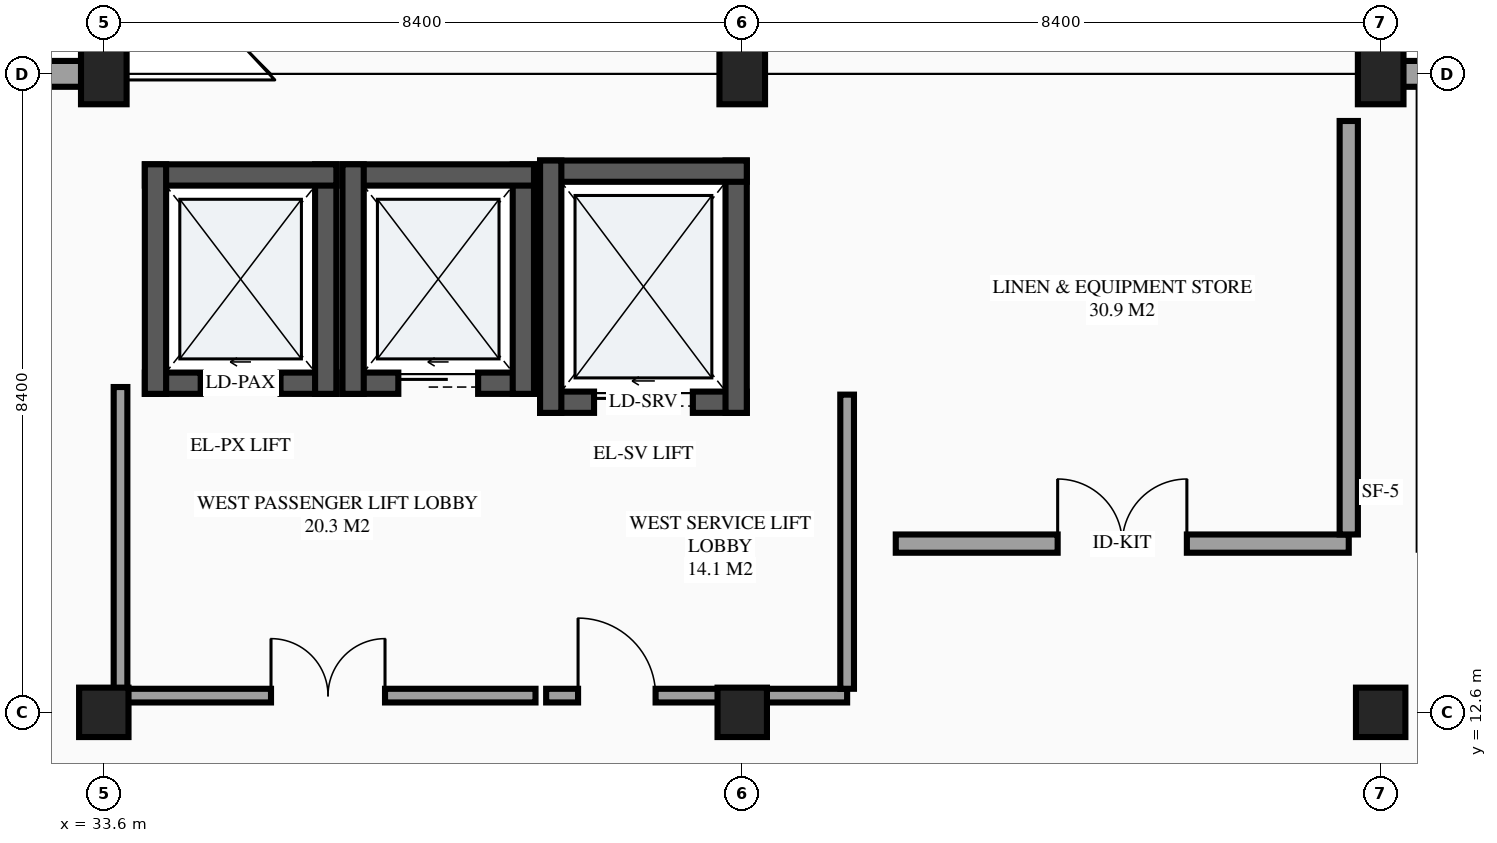
"""IFC4 building model, lengths in metres.
Left out: names, types, materials, properties, quantities, classifications, styles, units other than length and angle.
Written with IfcOpenShell. Run it as: python <this file> out.ifc"""

import sys

from ifc_helpers import new_model, si_unit, direction, frame, frame_2d, origin, origin_2d, place, context, subcontext, project, spatial, rectangle, extrude, element, fill, save


model = new_model("IFC4")
c1 = context("Model", 3, precision=1e-05, world=origin(), true_north=direction((0.0, 1.0)))
c2 = subcontext(c1, "Body", "Model", "MODEL_VIEW")
j1 = project(units=[si_unit("LENGTHUNIT", "METRE"), si_unit("PLANEANGLEUNIT", "RADIAN")], contexts=[c1])
p1 = place(None, origin())
s1 = spatial("IfcSite", under=j1, at=p1, CompositionType="ELEMENT")
p2 = place(p1, origin())
s2 = spatial("IfcBuilding", under=s1, at=p2, CompositionType="ELEMENT")
p3 = place(p2, frame((0.0, 0.0, 21.9)))
s3 = spatial("IfcBuildingStorey", under=s2, at=p3, CompositionType="ELEMENT", Elevation=21.9)
p4 = place(p3, frame((33.6, 12.6, 0.0), z_axis=(0.0, 0.0, 1.0), x_axis=(1.0, 0.0, 0.0)))
e1 = element("IfcColumn", 1, at=p4, inside=s3, PredefinedType="COLUMN", context=c2, shape_type="SweptSolid", body=[
    extrude(rectangle(XDim=0.65, YDim=0.65, at=origin_2d()), origin(), (0.0, 0.0, 1.0), 3.6),
])
p5 = place(p3, frame((33.6, 21.0, 0.0), z_axis=(0.0, 0.0, 1.0), x_axis=(1.0, 0.0, 0.0)))
e2 = element("IfcColumn", 2, at=p5, inside=s3, PredefinedType="COLUMN", context=c2, shape_type="SweptSolid", body=[
    extrude(rectangle(XDim=0.6, YDim=0.8, at=origin_2d()), origin(), (0.0, 0.0, 1.0), 3.6),
])
p6 = place(p3, frame((42.0, 12.6, 0.0), z_axis=(0.0, 0.0, 1.0), x_axis=(1.0, 0.0, 0.0)))
e3 = element("IfcColumn", 3, at=p6, inside=s3, PredefinedType="COLUMN", context=c2, shape_type="SweptSolid", body=[
    extrude(rectangle(XDim=0.65, YDim=0.65, at=origin_2d()), origin(), (0.0, 0.0, 1.0), 3.6),
])
p7 = place(p3, frame((42.0, 21.0, 0.0), z_axis=(0.0, 0.0, 1.0), x_axis=(1.0, 0.0, 0.0)))
e4 = element("IfcColumn", 4, at=p7, inside=s3, PredefinedType="COLUMN", context=c2, shape_type="SweptSolid", body=[
    extrude(rectangle(XDim=0.6, YDim=0.8, at=origin_2d()), origin(), (0.0, 0.0, 1.0), 3.6),
])
p8 = place(p3, frame((50.4, 12.6, 0.0), z_axis=(0.0, 0.0, 1.0), x_axis=(1.0, 0.0, 0.0)))
e5 = element("IfcColumn", 5, at=p8, inside=s3, PredefinedType="COLUMN", context=c2, shape_type="SweptSolid", body=[
    extrude(rectangle(XDim=0.65, YDim=0.65, at=origin_2d()), origin(), (0.0, 0.0, 1.0), 3.6),
])
p9 = place(p3, frame((50.4, 21.0, 0.0), z_axis=(0.0, 0.0, 1.0), x_axis=(1.0, 0.0, 0.0)))
e6 = element("IfcColumn", 6, at=p9, inside=s3, PredefinedType="COLUMN", context=c2, shape_type="SweptSolid", body=[
    extrude(rectangle(XDim=0.6, YDim=0.8, at=origin_2d()), origin(), (0.0, 0.0, 1.0), 3.6),
])
p10 = place(p3, frame((33.6, 21.0, 0.0), z_axis=(0.0, 0.0, 1.0), x_axis=(-1.0, 0.0, 0.0)))
e7 = element("IfcWall", 7, at=p10, inside=s3, PredefinedType="STANDARD", context=c2, shape_type="SweptSolid", body=[
    extrude(rectangle(XDim=2.0, YDim=0.34, at=frame_2d((1.0, 0.0))), origin(), (0.0, 0.0, 1.0), 2.58),
])
p11 = place(p3, frame((34.14, 16.93, 0.0), z_axis=(0.0, 0.0, 1.0), x_axis=(1.0, 0.0, 0.0)))
e8 = element("IfcWall", 8, at=p11, inside=s3, PredefinedType="SHEAR", context=c2, shape_type="SweptSolid", body=[
    extrude(rectangle(XDim=2.52, YDim=0.28, at=frame_2d((1.26, 0.0))), origin(), (0.0, 0.0, 1.0), 3.6),
])
p12 = place(p11, frame((0.735, 0.0, 0.0)))
e9 = element("IfcOpeningElement", 9, at=p12, cuts=e8, PredefinedType="OPENING", context=c2, shape_type="SweptSolid", body=[
    extrude(rectangle(XDim=1.05, YDim=2.2, at=frame_2d((0.525, 1.1))), frame((0.0, 0.15, 0.0), z_axis=(0.0, -1.0, 0.0), x_axis=(1.0, 0.0, 0.0)), (0.0, 0.0, 1.0), 0.3),
])
p13 = place(p3, frame((36.52, 16.79, 0.0), z_axis=(0.0, 0.0, 1.0), x_axis=(0.0, 1.0, 0.0)))
e10 = element("IfcWall", 10, at=p13, inside=s3, PredefinedType="SHEAR", context=c2, shape_type="SweptSolid", body=[
    extrude(rectangle(XDim=3.02, YDim=0.28, at=frame_2d((1.51, 0.0))), origin(), (0.0, 0.0, 1.0), 3.6),
])
p14 = place(p3, frame((36.66, 19.67, 0.0), z_axis=(0.0, 0.0, 1.0), x_axis=(-1.0, 0.0, 0.0)))
e11 = element("IfcWall", 11, at=p14, inside=s3, PredefinedType="SHEAR", context=c2, shape_type="SweptSolid", body=[
    extrude(rectangle(XDim=2.52, YDim=0.28, at=frame_2d((1.26, 0.0))), origin(), (0.0, 0.0, 1.0), 3.6),
])
p15 = place(p3, frame((34.28, 19.81, 0.0), z_axis=(0.0, 0.0, 1.0), x_axis=(0.0, -1.0, 0.0)))
e12 = element("IfcWall", 12, at=p15, inside=s3, PredefinedType="SHEAR", context=c2, shape_type="SweptSolid", body=[
    extrude(rectangle(XDim=3.02, YDim=0.28, at=frame_2d((1.51, 0.0))), origin(), (0.0, 0.0, 1.0), 3.6),
])
p16 = place(p3, frame((36.74, 16.93, 0.0), z_axis=(0.0, 0.0, 1.0), x_axis=(1.0, 0.0, 0.0)))
e13 = element("IfcWall", 13, at=p16, inside=s3, PredefinedType="SHEAR", context=c2, shape_type="SweptSolid", body=[
    extrude(rectangle(XDim=2.52, YDim=0.28, at=frame_2d((1.26, 0.0))), origin(), (0.0, 0.0, 1.0), 3.6),
])
p17 = place(p16, frame((0.735, 0.0, 0.0)))
e14 = element("IfcOpeningElement", 14, at=p17, cuts=e13, PredefinedType="OPENING", context=c2, shape_type="SweptSolid", body=[
    extrude(rectangle(XDim=1.05, YDim=2.2, at=frame_2d((0.525, 1.1))), frame((0.0, 0.15, 0.0), z_axis=(0.0, -1.0, 0.0), x_axis=(1.0, 0.0, 0.0)), (0.0, 0.0, 1.0), 0.3),
])
p18 = place(p3, frame((39.12, 16.79, 0.0), z_axis=(0.0, 0.0, 1.0), x_axis=(0.0, 1.0, 0.0)))
e15 = element("IfcWall", 15, at=p18, inside=s3, PredefinedType="SHEAR", context=c2, shape_type="SweptSolid", body=[
    extrude(rectangle(XDim=3.02, YDim=0.28, at=frame_2d((1.51, 0.0))), origin(), (0.0, 0.0, 1.0), 3.6),
])
p19 = place(p3, frame((39.26, 19.67, 0.0), z_axis=(0.0, 0.0, 1.0), x_axis=(-1.0, 0.0, 0.0)))
e16 = element("IfcWall", 16, at=p19, inside=s3, PredefinedType="SHEAR", context=c2, shape_type="SweptSolid", body=[
    extrude(rectangle(XDim=2.52, YDim=0.28, at=frame_2d((1.26, 0.0))), origin(), (0.0, 0.0, 1.0), 3.6),
])
p20 = place(p3, frame((36.88, 19.81, 0.0), z_axis=(0.0, 0.0, 1.0), x_axis=(0.0, -1.0, 0.0)))
e17 = element("IfcWall", 17, at=p20, inside=s3, PredefinedType="SHEAR", context=c2, shape_type="SweptSolid", body=[
    extrude(rectangle(XDim=3.02, YDim=0.28, at=frame_2d((1.51, 0.0))), origin(), (0.0, 0.0, 1.0), 3.6),
])
p21 = place(p3, frame((39.34, 16.68, 0.0), z_axis=(0.0, 0.0, 1.0), x_axis=(1.0, 0.0, 0.0)))
e18 = element("IfcWall", 18, at=p21, inside=s3, PredefinedType="SHEAR", context=c2, shape_type="SweptSolid", body=[
    extrude(rectangle(XDim=2.72, YDim=0.28, at=frame_2d((1.36, 0.0))), origin(), (0.0, 0.0, 1.0), 3.6),
])
p22 = place(p21, frame((0.71, 0.0, 0.0)))
e19 = element("IfcOpeningElement", 19, at=p22, cuts=e18, PredefinedType="OPENING", context=c2, shape_type="SweptSolid", body=[
    extrude(rectangle(XDim=1.3, YDim=2.25, at=frame_2d((0.65, 1.125))), frame((0.0, 0.15, 0.0), z_axis=(0.0, -1.0, 0.0), x_axis=(1.0, 0.0, 0.0)), (0.0, 0.0, 1.0), 0.3),
])
p23 = place(p3, frame((41.92, 16.54, 0.0), z_axis=(0.0, 0.0, 1.0), x_axis=(0.0, 1.0, 0.0)))
e20 = element("IfcWall", 20, at=p23, inside=s3, PredefinedType="SHEAR", context=c2, shape_type="SweptSolid", body=[
    extrude(rectangle(XDim=3.32, YDim=0.28, at=frame_2d((1.66, 0.0))), origin(), (0.0, 0.0, 1.0), 3.6),
])
p24 = place(p3, frame((42.06, 19.72, 0.0), z_axis=(0.0, 0.0, 1.0), x_axis=(-1.0, 0.0, 0.0)))
e21 = element("IfcWall", 21, at=p24, inside=s3, PredefinedType="SHEAR", context=c2, shape_type="SweptSolid", body=[
    extrude(rectangle(XDim=2.72, YDim=0.28, at=frame_2d((1.36, 0.0))), origin(), (0.0, 0.0, 1.0), 3.6),
])
p25 = place(p3, frame((39.48, 19.86, 0.0), z_axis=(0.0, 0.0, 1.0), x_axis=(0.0, -1.0, 0.0)))
e22 = element("IfcWall", 22, at=p25, inside=s3, PredefinedType="SHEAR", context=c2, shape_type="SweptSolid", body=[
    extrude(rectangle(XDim=3.32, YDim=0.28, at=frame_2d((1.66, 0.0))), origin(), (0.0, 0.0, 1.0), 3.6),
])
p26 = place(p3, frame((33.82, 12.82, 0.0), z_axis=(0.0, 0.0, 1.0), x_axis=(1.0, 0.0, 0.0)))
e23 = element("IfcWall", 23, at=p26, inside=s3, PredefinedType="PARTITIONING", context=c2, shape_type="SweptSolid", body=[
    extrude(rectangle(XDim=5.46, YDim=0.18, at=frame_2d((2.73, 0.0))), origin(), (0.0, 0.0, 1.0), 2.63),
])
p27 = place(p26, frame((1.98, 0.0, 0.0)))
e24 = element("IfcOpeningElement", 24, at=p27, cuts=e23, PredefinedType="OPENING", context=c2, shape_type="SweptSolid", body=[
    extrude(rectangle(XDim=1.5, YDim=2.15, at=frame_2d((0.75, 1.075))), frame((0.0, 0.1, 0.0), z_axis=(0.0, -1.0, 0.0), x_axis=(1.0, 0.0, 0.0)), (0.0, 0.0, 1.0), 0.2),
])
p28 = place(p3, frame((33.82, 12.91, 0.0), z_axis=(0.0, 0.0, 1.0), x_axis=(0.0, 1.0, 0.0)))
e25 = element("IfcWall", 25, at=p28, inside=s3, PredefinedType="PARTITIONING", context=c2, shape_type="SweptSolid", body=[
    extrude(rectangle(XDim=3.97, YDim=0.18, at=frame_2d((1.985, 0.0))), origin(), (0.0, 0.0, 1.0), 3.375),
])
p29 = place(p3, frame((39.42, 12.82, 0.0), z_axis=(0.0, 0.0, 1.0), x_axis=(1.0, 0.0, 0.0)))
e26 = element("IfcWall", 26, at=p29, inside=s3, PredefinedType="PARTITIONING", context=c2, shape_type="SweptSolid", body=[
    extrude(rectangle(XDim=3.96, YDim=0.18, at=frame_2d((1.98, 0.0))), origin(), (0.0, 0.0, 1.0), 2.63),
])
p30 = place(p29, frame((0.42, 0.0, 0.0)))
e27 = element("IfcOpeningElement", 27, at=p30, cuts=e26, PredefinedType="OPENING", context=c2, shape_type="SweptSolid", body=[
    extrude(rectangle(XDim=1.02, YDim=2.15, at=frame_2d((0.51, 1.075))), frame((0.0, 0.1, 0.0), z_axis=(0.0, -1.0, 0.0), x_axis=(1.0, 0.0, 0.0)), (0.0, 0.0, 1.0), 0.2),
])
p31 = place(p3, frame((43.38, 12.91, 0.0), z_axis=(0.0, 0.0, 1.0), x_axis=(0.0, 1.0, 0.0)))
e28 = element("IfcWall", 28, at=p31, inside=s3, PredefinedType="PARTITIONING", context=c2, shape_type="SweptSolid", body=[
    extrude(rectangle(XDim=3.87, YDim=0.18, at=frame_2d((1.935, 0.0))), origin(), (0.0, 0.0, 1.0), 3.375),
])
p32 = place(p3, frame((44.02, 14.82, 0.0), z_axis=(0.0, 0.0, 1.0), x_axis=(1.0, 0.0, 0.0)))
e29 = element("IfcWall", 29, at=p32, inside=s3, PredefinedType="PARTITIONING", context=c2, shape_type="SweptSolid", body=[
    extrude(rectangle(XDim=5.96, YDim=0.24, at=frame_2d((2.98, 0.0))), origin(), (0.0, 0.0, 1.0), 3.375),
])
p33 = place(p32, frame((2.13, 0.0, 0.0)))
e30 = element("IfcOpeningElement", 30, at=p33, cuts=e29, PredefinedType="OPENING", context=c2, shape_type="SweptSolid", body=[
    extrude(rectangle(XDim=1.7, YDim=2.2, at=frame_2d((0.85, 1.1))), frame((0.0, 0.13, 0.0), z_axis=(0.0, -1.0, 0.0), x_axis=(1.0, 0.0, 0.0)), (0.0, 0.0, 1.0), 0.26),
])
p34 = place(p3, frame((49.98, 14.94, 0.0), z_axis=(0.0, 0.0, 1.0), x_axis=(0.0, 1.0, 0.0)))
e31 = element("IfcWall", 31, at=p34, inside=s3, PredefinedType="PARTITIONING", context=c2, shape_type="SweptSolid", body=[
    extrude(rectangle(XDim=5.44, YDim=0.24, at=frame_2d((2.72, 0.0))), origin(), (0.0, 0.0, 1.0), 3.375),
])
p35 = place(p3, frame((58.8, 21.0, 0.0), z_axis=(0.0, 0.0, 1.0), x_axis=(-1.0, 0.0, 0.0)))
e32 = element("IfcWall", 32, at=p35, inside=s3, PredefinedType="STANDARD", context=c2, shape_type="SweptSolid", body=[
    extrude(rectangle(XDim=8.4, YDim=0.34, at=frame_2d((4.2, 0.0))), origin(), (0.0, 0.0, 1.0), 2.63),
])
p36 = place(p35, frame((3.3, 0.0, 0.75)))
e33 = element("IfcOpeningElement", 33, at=p36, cuts=e32, PredefinedType="OPENING", context=c2, shape_type="SweptSolid", body=[
    extrude(rectangle(XDim=1.8, YDim=1.5, at=frame_2d((0.9, 0.75))), frame((0.0, 0.18, 0.0), z_axis=(0.0, -1.0, 0.0), x_axis=(1.0, 0.0, 0.0)), (0.0, 0.0, 1.0), 0.36),
])
p37 = place(p3, frame((50.4, 21.0, 0.0), z_axis=(0.0, 0.0, 1.0), x_axis=(0.0, 1.0, 0.0)))
e34 = element("IfcWall", 34, at=p37, inside=s3, PredefinedType="STANDARD", context=c2, shape_type="SweptSolid", body=[
    extrude(rectangle(XDim=8.4, YDim=0.34, at=frame_2d((4.2, 0.0))), origin(), (0.0, 0.0, 1.0), 2.68),
])
p38 = place(p37, frame((2.4, 0.0, 0.85)))
e35 = element("IfcOpeningElement", 35, at=p38, cuts=e34, PredefinedType="OPENING", context=c2, shape_type="SweptSolid", body=[
    extrude(rectangle(XDim=1.5, YDim=1.5, at=frame_2d((0.75, 0.75))), frame((0.0, 0.18, 0.0), z_axis=(0.0, -1.0, 0.0), x_axis=(1.0, 0.0, 0.0)), (0.0, 0.0, 1.0), 0.36),
])
p39 = place(p3, frame((33.6, 29.4, 0.0), z_axis=(0.0, 0.0, 1.0), x_axis=(0.0, -1.0, 0.0)))
e36 = element("IfcWall", 36, at=p39, inside=s3, PredefinedType="STANDARD", context=c2, shape_type="SweptSolid", body=[
    extrude(rectangle(XDim=8.4, YDim=0.34, at=frame_2d((4.2, 0.0))), origin(), (0.0, 0.0, 1.0), 2.88),
])
p40 = place(p39, frame((4.106, 0.0, 0.85)))
e37 = element("IfcOpeningElement", 37, at=p40, cuts=e36, PredefinedType="OPENING", context=c2, shape_type="SweptSolid", body=[
    extrude(rectangle(XDim=1.5, YDim=1.5, at=frame_2d((0.75, 0.75))), frame((0.0, 0.18, 0.0), z_axis=(0.0, -1.0, 0.0), x_axis=(1.0, 0.0, 0.0)), (0.0, 0.0, 1.0), 0.36),
])
p41 = place(p12, origin())
e38 = element("IfcDoor", 38, at=p41, inside=s3, OperationType="SLIDING_TO_LEFT", PredefinedType="DOOR", context=c2, shape_type="SweptSolid", body=[
    extrude(rectangle(XDim=1.05, YDim=2.2, at=frame_2d((0.525, 1.1))), frame((0.0, 0.025, 0.0), z_axis=(0.0, -1.0, 0.0), x_axis=(1.0, 0.0, 0.0)), (0.0, 0.0, 1.0), 0.05),
])
fill(e9, e38)
p42 = place(p17, origin())
e39 = element("IfcDoor", 39, at=p42, inside=s3, OperationType="SLIDING_TO_LEFT", PredefinedType="DOOR", context=c2, shape_type="SweptSolid", body=[
    extrude(rectangle(XDim=1.05, YDim=2.2, at=frame_2d((0.525, 1.1))), frame((0.0, 0.025, 0.0), z_axis=(0.0, -1.0, 0.0), x_axis=(1.0, 0.0, 0.0)), (0.0, 0.0, 1.0), 0.05),
])
fill(e14, e39)
p43 = place(p22, origin())
e40 = element("IfcDoor", 40, at=p43, inside=s3, OperationType="SLIDING_TO_LEFT", PredefinedType="DOOR", context=c2, shape_type="SweptSolid", body=[
    extrude(rectangle(XDim=1.3, YDim=2.25, at=frame_2d((0.65, 1.125))), frame((0.0, 0.025, 0.0), z_axis=(0.0, -1.0, 0.0), x_axis=(1.0, 0.0, 0.0)), (0.0, 0.0, 1.0), 0.05),
])
fill(e19, e40)
p44 = place(p27, origin())
e41 = element("IfcDoor", 41, at=p44, inside=s3, OperationType="DOUBLE_DOOR_SINGLE_SWING", PredefinedType="DOOR", context=c2, shape_type="SweptSolid", body=[
    extrude(rectangle(XDim=1.5, YDim=2.15, at=frame_2d((0.75, 1.075))), frame((0.0, 0.025, 0.0), z_axis=(0.0, -1.0, 0.0), x_axis=(1.0, 0.0, 0.0)), (0.0, 0.0, 1.0), 0.05),
])
fill(e24, e41)
p45 = place(p30, origin())
e42 = element("IfcDoor", 42, at=p45, inside=s3, OperationType="SINGLE_SWING_LEFT", PredefinedType="DOOR", context=c2, shape_type="SweptSolid", body=[
    extrude(rectangle(XDim=1.02, YDim=2.15, at=frame_2d((0.51, 1.075))), frame((0.0, 0.025, 0.0), z_axis=(0.0, -1.0, 0.0), x_axis=(1.0, 0.0, 0.0)), (0.0, 0.0, 1.0), 0.05),
])
fill(e27, e42)
p46 = place(p33, origin())
e43 = element("IfcDoor", 43, at=p46, inside=s3, OperationType="DOUBLE_DOOR_SINGLE_SWING", PredefinedType="DOOR", context=c2, shape_type="SweptSolid", body=[
    extrude(rectangle(XDim=1.7, YDim=2.2, at=frame_2d((0.85, 1.1))), frame((0.0, 0.025, 0.0), z_axis=(0.0, -1.0, 0.0), x_axis=(1.0, 0.0, 0.0)), (0.0, 0.0, 1.0), 0.05),
])
fill(e30, e43)
save(model, sys.argv[1])
